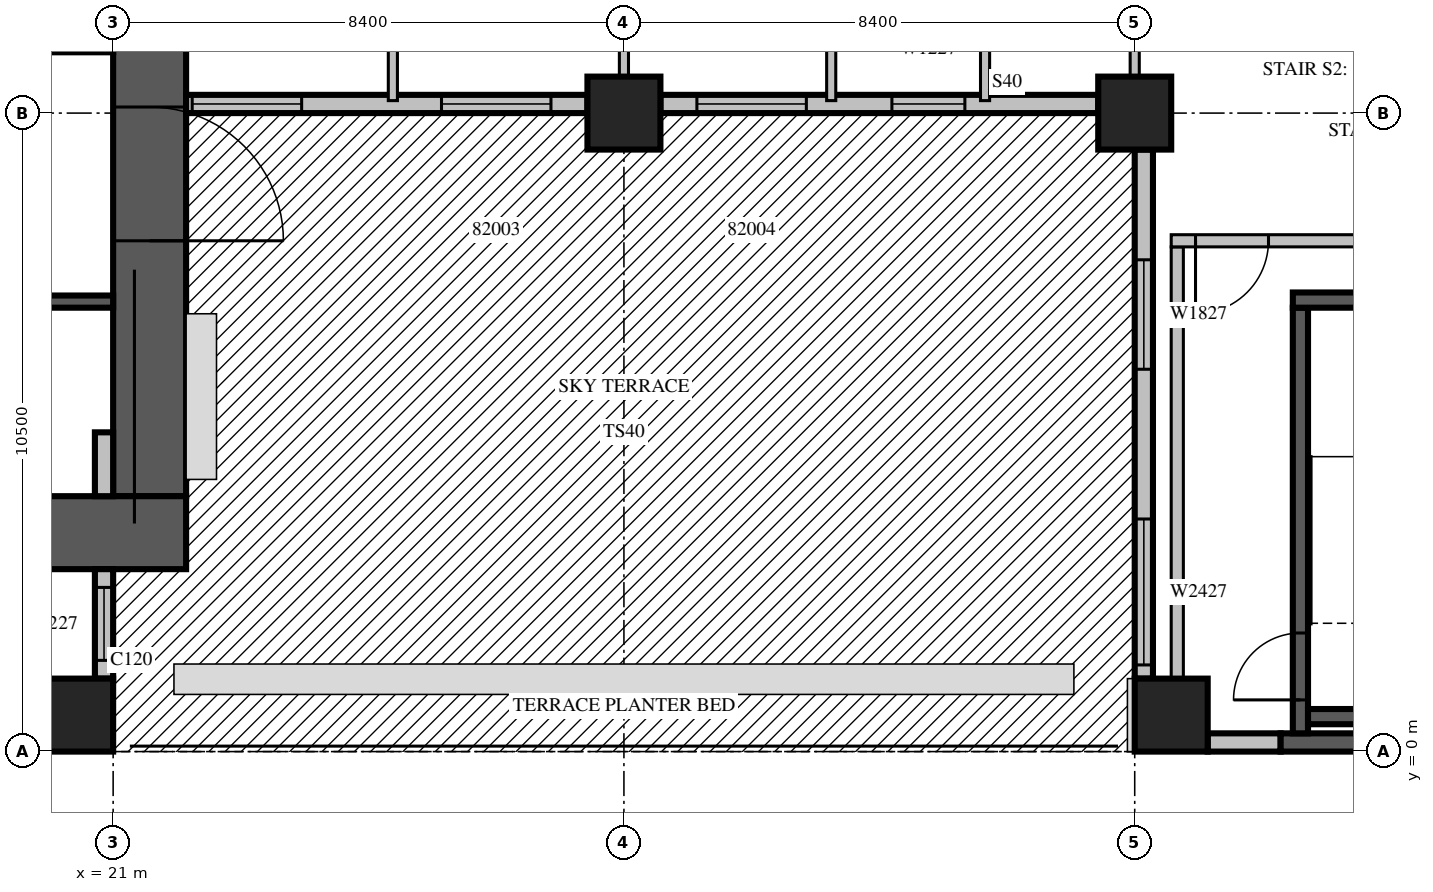
"""IFC4 building model, lengths in metres.
Left out: names, types, materials, properties, quantities, classifications, styles, units other than length and angle.
Written with IfcOpenShell. Run it as: python <this file> out.ifc"""

import sys

from ifc_helpers import new_model, si_unit, direction, frame, frame_2d, origin, origin_2d, place, context, subcontext, project, spatial, rectangle, extrude, source, transform, mapped, element, fill, save


model = new_model("IFC4")
c1 = context("Model", 3, precision=1e-05, world=origin(), true_north=direction((0.0, 1.0)))
c2 = subcontext(c1, "Body", "Model", "MODEL_VIEW")
j1 = project(units=[si_unit("LENGTHUNIT", "METRE"), si_unit("PLANEANGLEUNIT", "RADIAN")], contexts=[c1])
p1 = place(None, origin())
s1 = spatial("IfcSite", under=j1, at=p1, CompositionType="ELEMENT")
p2 = place(p1, origin())
s2 = spatial("IfcBuilding", under=s1, at=p2, CompositionType="ELEMENT")
p3 = place(p2, frame((0.0, 0.0, 95.1)))
s3 = spatial("IfcBuildingStorey", under=s2, at=p3, CompositionType="ELEMENT", Elevation=95.1)
m1 = source(origin(), c2, "Body", "SweptSolid", [
    extrude(rectangle(XDim=1.2, YDim=1.2, at=origin_2d()), origin(), (0.0, 0.0, 1.0), 4.2),
])
for number, where, z_axis, x_axis in (
    (1, (20.4, 0.6, 0.0), (0.0, 0.0, 1.0), (1.0, 0.0, 0.0)),
    (2, (38.4, 0.6, 0.0), (0.0, 0.0, 1.0), (1.0, 0.0, 0.0)),
    (3, (29.4, 10.5, 0.0), (0.0, 0.0, 1.0), (1.0, 0.0, 0.0)),
    (4, (37.8, 10.5, 0.0), (0.0, 0.0, 1.0), (1.0, 0.0, 0.0)),
):
    element("IfcColumn", number, at=place(p3, frame(where, z_axis=z_axis, x_axis=x_axis)), inside=s3, PredefinedType="COLUMN", context=c2, shape_type="MappedRepresentation", body=[
        mapped(m1, transform((0.0, 0.0, 0.0), scale=1.0)),
    ])
m2 = source(origin(), c2, "Body", "SweptSolid", [
    extrude(rectangle(XDim=16.8, YDim=1.2, at=frame_2d((8.4, 0.0))), origin(), (0.0, 0.0, 1.0), 4.2),
])
p4 = place(p3, frame((21.6, 4.2, 0.0), z_axis=(0.0, 0.0, 1.0), x_axis=(0.0, 1.0, 0.0)))
e5 = element("IfcWall", 5, at=p4, inside=s3, PredefinedType="SHEAR", context=c2, shape_type="MappedRepresentation", body=[
    mapped(m2, transform((0.0, 0.0, 0.0), scale=1.0)),
])
m3 = source(origin(), c2, "Body", "SweptSolid", [
    extrude(rectangle(XDim=2.2, YDim=2.1, at=frame_2d((1.1, 1.05))), frame((0.0, 0.61, 0.0), z_axis=(0.0, -1.0, 0.0), x_axis=(1.0, 0.0, 0.0)), (0.0, 0.0, 1.0), 1.22),
])
p5 = place(p4, frame((4.2, 0.0, 0.0)))
e6 = element("IfcOpeningElement", 6, at=p5, cuts=e5, PredefinedType="OPENING", context=c2, shape_type="MappedRepresentation", body=[
    mapped(m3, transform((0.0, 0.0, 0.0), scale=1.0)),
])
m4 = source(origin(), c2, "Body", "SweptSolid", [
    extrude(rectangle(XDim=1.2, YDim=2.1, at=frame_2d((0.6, 1.05))), frame((0.0, 0.61, 0.0), z_axis=(0.0, -1.0, 0.0), x_axis=(1.0, 0.0, 0.0)), (0.0, 0.0, 1.0), 1.22),
])
p6 = place(p4, frame((14.7, 0.0, 0.0)))
e7 = element("IfcOpeningElement", 7, at=p6, cuts=e5, PredefinedType="OPENING", context=c2, shape_type="MappedRepresentation", body=[
    mapped(m4, transform((0.0, 0.0, 0.0), scale=1.0)),
])
m5 = source(origin(), c2, "Body", "SweptSolid", [
    extrude(rectangle(XDim=18.0, YDim=1.2, at=frame_2d((9.0, 0.0))), origin(), (0.0, 0.0, 1.0), 4.2),
])
p7 = place(p3, frame((4.2, 3.6, 0.0), z_axis=(0.0, 0.0, 1.0), x_axis=(1.0, 0.0, 0.0)))
e8 = element("IfcWall", 8, at=p7, inside=s3, PredefinedType="SHEAR", context=c2, shape_type="MappedRepresentation", body=[
    mapped(m5, transform((0.0, 0.0, 0.0), scale=1.0)),
])
m6 = source(origin(), c2, "Body", "SweptSolid", [
    extrude(rectangle(XDim=1.8, YDim=0.3, at=frame_2d((0.9, 0.0))), origin(), (0.0, 0.0, 1.0), 3.8),
])
p8 = place(p3, frame((20.85, 1.2, 0.0), z_axis=(0.0, 0.0, 1.0), x_axis=(0.0, 1.0, 0.0)))
e9 = element("IfcWall", 9, at=p8, inside=s3, PredefinedType="STANDARD", context=c2, shape_type="MappedRepresentation", body=[
    mapped(m6, transform((0.0, 0.0, 0.0), scale=1.0)),
])
m7 = source(origin(), c2, "Body", "SweptSolid", [
    extrude(rectangle(XDim=1.2, YDim=2.7, at=frame_2d((0.6, 1.35))), frame((0.0, 0.16, 0.0), z_axis=(0.0, -1.0, 0.0), x_axis=(1.0, 0.0, 0.0)), (0.0, 0.0, 1.0), 0.32),
])
p9 = place(p8, frame((0.3, 0.0, 0.6)))
e10 = element("IfcOpeningElement", 10, at=p9, cuts=e9, PredefinedType="OPENING", context=c2, shape_type="MappedRepresentation", body=[
    mapped(m7, transform((0.0, 0.0, 0.0), scale=1.0)),
])
m8 = source(origin(), c2, "Body", "SweptSolid", [
    extrude(rectangle(XDim=1.05, YDim=0.3, at=frame_2d((0.525, 0.0))), origin(), (0.0, 0.0, 1.0), 3.8),
])
p10 = place(p3, frame((20.85, 4.2, 0.0), z_axis=(0.0, 0.0, 1.0), x_axis=(0.0, 1.0, 0.0)))
e11 = element("IfcWall", 11, at=p10, inside=s3, PredefinedType="STANDARD", context=c2, shape_type="MappedRepresentation", body=[
    mapped(m8, transform((0.0, 0.0, 0.0), scale=1.0)),
])
m9 = source(origin(), c2, "Body", "SweptSolid", [
    extrude(rectangle(XDim=6.6, YDim=0.3, at=frame_2d((3.3, 0.0))), origin(), (0.0, 0.0, 1.0), 3.8),
])
p11 = place(p3, frame((22.2, 10.65, 0.0), z_axis=(0.0, 0.0, 1.0), x_axis=(1.0, 0.0, 0.0)))
e12 = element("IfcWall", 12, at=p11, inside=s3, PredefinedType="STANDARD", context=c2, shape_type="MappedRepresentation", body=[
    mapped(m9, transform((0.0, 0.0, 0.0), scale=1.0)),
])
m10 = source(origin(), c2, "Body", "SweptSolid", [
    extrude(rectangle(XDim=1.8, YDim=2.4, at=frame_2d((0.9, 1.2))), frame((0.0, 0.16, 0.0), z_axis=(0.0, -1.0, 0.0), x_axis=(1.0, 0.0, 0.0)), (0.0, 0.0, 1.0), 0.32),
])
p12 = place(p11, frame((0.1, 0.0, 0.0)))
e13 = element("IfcOpeningElement", 13, at=p12, cuts=e12, PredefinedType="OPENING", context=c2, shape_type="MappedRepresentation", body=[
    mapped(m10, transform((0.0, 0.0, 0.0), scale=1.0)),
])
p13 = place(p11, frame((4.2, 0.0, 0.0)))
e14 = element("IfcOpeningElement", 14, at=p13, cuts=e12, PredefinedType="OPENING", context=c2, shape_type="MappedRepresentation", body=[
    mapped(m10, transform((0.0, 0.0, 0.0), scale=1.0)),
])
m11 = source(origin(), c2, "Body", "SweptSolid", [
    extrude(rectangle(XDim=7.2, YDim=0.3, at=frame_2d((3.6, 0.0))), origin(), (0.0, 0.0, 1.0), 3.8),
])
p14 = place(p3, frame((30.0, 10.65, 0.0), z_axis=(0.0, 0.0, 1.0), x_axis=(1.0, 0.0, 0.0)))
e15 = element("IfcWall", 15, at=p14, inside=s3, PredefinedType="STANDARD", context=c2, shape_type="MappedRepresentation", body=[
    mapped(m11, transform((0.0, 0.0, 0.0), scale=1.0)),
])
p15 = place(p14, frame((0.6, 0.0, 0.0)))
e16 = element("IfcOpeningElement", 16, at=p15, cuts=e15, PredefinedType="OPENING", context=c2, shape_type="MappedRepresentation", body=[
    mapped(m10, transform((0.0, 0.0, 0.0), scale=1.0)),
])
p16 = place(p14, frame((3.807, 0.0, 0.6)))
e17 = element("IfcOpeningElement", 17, at=p16, cuts=e15, PredefinedType="OPENING", context=c2, shape_type="MappedRepresentation", body=[
    mapped(m7, transform((0.0, 0.0, 0.0), scale=1.0)),
])
m12 = source(origin(), c2, "Body", "SweptSolid", [
    extrude(rectangle(XDim=8.7, YDim=0.3, at=frame_2d((4.35, 0.0))), origin(), (0.0, 0.0, 1.0), 3.8),
])
p17 = place(p3, frame((37.95, 9.9, 0.0), z_axis=(0.0, 0.0, 1.0), x_axis=(0.0, -1.0, 0.0)))
e18 = element("IfcWall", 18, at=p17, inside=s3, PredefinedType="STANDARD", context=c2, shape_type="MappedRepresentation", body=[
    mapped(m12, transform((0.0, 0.0, 0.0), scale=1.0)),
])
m13 = source(origin(), c2, "Body", "SweptSolid", [
    extrude(rectangle(XDim=1.8, YDim=2.7, at=frame_2d((0.9, 1.35))), frame((0.0, 0.16, 0.0), z_axis=(0.0, -1.0, 0.0), x_axis=(1.0, 0.0, 0.0)), (0.0, 0.0, 1.0), 0.32),
])
p18 = place(p17, frame((1.812, 0.0, 0.6)))
e19 = element("IfcOpeningElement", 19, at=p18, cuts=e18, PredefinedType="OPENING", context=c2, shape_type="MappedRepresentation", body=[
    mapped(m13, transform((0.0, 0.0, 0.0), scale=1.0)),
])
m14 = source(origin(), c2, "Body", "SweptSolid", [
    extrude(rectangle(XDim=2.4, YDim=2.7, at=frame_2d((1.2, 1.35))), frame((0.0, 0.16, 0.0), z_axis=(0.0, -1.0, 0.0), x_axis=(1.0, 0.0, 0.0)), (0.0, 0.0, 1.0), 0.32),
])
p19 = place(p17, frame((6.075, 0.0, 0.6)))
e20 = element("IfcOpeningElement", 20, at=p19, cuts=e18, PredefinedType="OPENING", context=c2, shape_type="MappedRepresentation", body=[
    mapped(m14, transform((0.0, 0.0, 0.0), scale=1.0)),
])
m15 = source(origin(), c2, "Body", "SweptSolid", [
    extrude(rectangle(XDim=1.2, YDim=0.3, at=frame_2d((0.6, 0.0))), origin(), (0.0, 0.0, 1.0), 3.8),
])
p20 = place(p3, frame((39.0, 0.15, 0.0), z_axis=(0.0, 0.0, 1.0), x_axis=(1.0, 0.0, 0.0)))
e21 = element("IfcWall", 21, at=p20, inside=s3, PredefinedType="STANDARD", context=c2, shape_type="MappedRepresentation", body=[
    mapped(m15, transform((0.0, 0.0, 0.0), scale=1.0)),
])
m16 = source(origin(), c2, "Body", "SweptSolid", [
    extrude(rectangle(XDim=3.8, YDim=0.3, at=frame_2d((1.9, 0.0))), origin(), (0.0, 0.0, 1.0), 3.8),
])
p21 = place(p3, frame((40.2, 0.15, 0.0), z_axis=(0.0, 0.0, 1.0), x_axis=(1.0, 0.0, 0.0)))
e22 = element("IfcWall", 22, at=p21, inside=s3, PredefinedType="SOLIDWALL", context=c2, shape_type="MappedRepresentation", body=[
    mapped(m16, transform((0.0, 0.0, 0.0), scale=1.0)),
])
m17 = source(origin(), c2, "Body", "SweptSolid", [
    extrude(rectangle(XDim=16.8, YDim=0.2, at=frame_2d((8.4, 0.0))), origin(), (0.0, 0.0, 1.0), 4.2),
])
p22 = place(p3, frame((4.2, 7.4, 0.0), z_axis=(0.0, 0.0, 1.0), x_axis=(1.0, 0.0, 0.0)))
e23 = element("IfcWall", 23, at=p22, inside=s3, PredefinedType="SOLIDWALL", context=c2, shape_type="MappedRepresentation", body=[
    mapped(m17, transform((0.0, 0.0, 0.0), scale=1.0)),
])
m18 = source(origin(), c2, "Body", "SweptSolid", [
    extrude(rectangle(XDim=1.1, YDim=2.1, at=frame_2d((0.55, 1.05))), frame((0.0, 0.11, 0.0), z_axis=(0.0, -1.0, 0.0), x_axis=(1.0, 0.0, 0.0)), (0.0, 0.0, 1.0), 0.22),
])
p23 = place(p22, frame((0.65, 0.0, 0.0)))
e24 = element("IfcOpeningElement", 24, at=p23, cuts=e23, PredefinedType="OPENING", context=c2, shape_type="MappedRepresentation", body=[
    mapped(m18, transform((0.0, 0.0, 0.0), scale=1.0)),
])
p24 = place(p22, frame((3.05, 0.0, 0.0)))
e25 = element("IfcOpeningElement", 25, at=p24, cuts=e23, PredefinedType="OPENING", context=c2, shape_type="MappedRepresentation", body=[
    mapped(m18, transform((0.0, 0.0, 0.0), scale=1.0)),
])
p25 = place(p22, frame((5.45, 0.0, 0.0)))
e26 = element("IfcOpeningElement", 26, at=p25, cuts=e23, PredefinedType="OPENING", context=c2, shape_type="MappedRepresentation", body=[
    mapped(m18, transform((0.0, 0.0, 0.0), scale=1.0)),
])
p26 = place(p22, frame((7.85, 0.0, 0.0)))
e27 = element("IfcOpeningElement", 27, at=p26, cuts=e23, PredefinedType="OPENING", context=c2, shape_type="MappedRepresentation", body=[
    mapped(m18, transform((0.0, 0.0, 0.0), scale=1.0)),
])
m19 = source(origin(), c2, "Body", "SweptSolid", [
    extrude(rectangle(XDim=7.0, YDim=0.25, at=frame_2d((3.5, 0.0))), origin(), (0.0, 0.0, 1.0), 3.8),
])
p27 = place(p3, frame((40.525, 0.3, 0.0), z_axis=(0.0, 0.0, 1.0), x_axis=(0.0, 1.0, 0.0)))
e28 = element("IfcWall", 28, at=p27, inside=s3, PredefinedType="SOLIDWALL", context=c2, shape_type="MappedRepresentation", body=[
    mapped(m19, transform((0.0, 0.0, 0.0), scale=1.0)),
])
m20 = source(origin(), c2, "Body", "SweptSolid", [
    extrude(rectangle(XDim=1.1, YDim=2.1, at=frame_2d((0.55, 1.05))), frame((0.0, 0.135, 0.0), z_axis=(0.0, -1.0, 0.0), x_axis=(1.0, 0.0, 0.0)), (0.0, 0.0, 1.0), 0.27),
])
p28 = place(p27, frame((0.55, 0.0, 0.0)))
e29 = element("IfcOpeningElement", 29, at=p28, cuts=e28, PredefinedType="OPENING", context=c2, shape_type="MappedRepresentation", body=[
    mapped(m20, transform((0.0, 0.0, 0.0), scale=1.0)),
])
m21 = source(origin(), c2, "Body", "SweptSolid", [
    extrude(rectangle(XDim=3.45, YDim=0.25, at=frame_2d((1.725, 0.0))), origin(), (0.0, 0.0, 1.0), 3.8),
])
p29 = place(p3, frame((40.4, 7.425, 0.0), z_axis=(0.0, 0.0, 1.0), x_axis=(1.0, 0.0, 0.0)))
e30 = element("IfcWall", 30, at=p29, inside=s3, PredefinedType="SOLIDWALL", context=c2, shape_type="MappedRepresentation", body=[
    mapped(m21, transform((0.0, 0.0, 0.0), scale=1.0)),
])
m22 = source(origin(), c2, "Body", "SweptSolid", [
    extrude(rectangle(XDim=2.95, YDim=0.25, at=frame_2d((1.475, 0.0))), origin(), (0.0, 0.0, 1.0), 3.8),
])
p30 = place(p3, frame((40.65, 0.575, 0.0), z_axis=(0.0, 0.0, 1.0), x_axis=(1.0, 0.0, 0.0)))
e31 = element("IfcWall", 31, at=p30, inside=s3, PredefinedType="SOLIDWALL", context=c2, shape_type="MappedRepresentation", body=[
    mapped(m22, transform((0.0, 0.0, 0.0), scale=1.0)),
])
m23 = source(origin(), c2, "Body", "SweptSolid", [
    extrude(rectangle(XDim=8.0, YDim=0.2, at=frame_2d((4.0, 0.0))), origin(), (0.0, 0.0, 1.0), 3.8),
])
p31 = place(p3, frame((38.5, 0.3, 0.0), z_axis=(0.0, 0.0, 1.0), x_axis=(0.0, 1.0, 0.0)))
e32 = element("IfcWall", 32, at=p31, inside=s3, PredefinedType="PARTITIONING", context=c2, shape_type="MappedRepresentation", body=[
    mapped(m23, transform((0.0, 0.0, 0.0), scale=1.0)),
])
m24 = source(origin(), c2, "Body", "SweptSolid", [
    extrude(rectangle(XDim=5.45, YDim=0.2, at=frame_2d((2.725, 0.0))), origin(), (0.0, 0.0, 1.0), 3.8),
])
p32 = place(p3, frame((38.4, 8.4, 0.0), z_axis=(0.0, 0.0, 1.0), x_axis=(1.0, 0.0, 0.0)))
e33 = element("IfcWall", 33, at=p32, inside=s3, PredefinedType="PARTITIONING", context=c2, shape_type="MappedRepresentation", body=[
    mapped(m24, transform((0.0, 0.0, 0.0), scale=1.0)),
])
m25 = source(origin(), c2, "Body", "SweptSolid", [
    extrude(rectangle(XDim=1.2, YDim=2.1, at=frame_2d((0.6, 1.05))), frame((0.0, 0.11, 0.0), z_axis=(0.0, -1.0, 0.0), x_axis=(1.0, 0.0, 0.0)), (0.0, 0.0, 1.0), 0.22),
])
p33 = place(p32, frame((0.4, 0.0, 0.0)))
e34 = element("IfcOpeningElement", 34, at=p33, cuts=e33, PredefinedType="OPENING", context=c2, shape_type="MappedRepresentation", body=[
    mapped(m25, transform((0.0, 0.0, 0.0), scale=1.0)),
])
m26 = source(origin(), c2, "Body", "SweptSolid", [
    extrude(rectangle(XDim=0.9, YDim=2.1, at=frame_2d((0.45, 1.05))), frame((0.0, 0.11, 0.0), z_axis=(0.0, -1.0, 0.0), x_axis=(1.0, 0.0, 0.0)), (0.0, 0.0, 1.0), 0.22),
])
p34 = place(p32, frame((3.25, 0.0, 0.0)))
e35 = element("IfcOpeningElement", 35, at=p34, cuts=e33, PredefinedType="OPENING", context=c2, shape_type="MappedRepresentation", body=[
    mapped(m26, transform((0.0, 0.0, 0.0), scale=1.0)),
])
m27 = source(origin(), c2, "Body", "SweptSolid", [
    extrude(rectangle(XDim=4.295, YDim=0.15, at=frame_2d((2.147, 0.0))), origin(), (0.0, 0.0, 1.0), 3.8),
])
p35 = place(p3, frame((25.6, 15.0, 0.0), z_axis=(0.0, 0.0, 1.0), x_axis=(0.0, -1.0, 0.0)))
e36 = element("IfcWall", 36, at=p35, inside=s3, PredefinedType="PARTITIONING", context=c2, shape_type="MappedRepresentation", body=[
    mapped(m27, transform((0.0, 0.0, 0.0), scale=1.0)),
])
m28 = source(origin(), c2, "Body", "SweptSolid", [
    extrude(rectangle(XDim=0.9, YDim=2.1, at=frame_2d((0.45, 1.05))), frame((0.0, 0.085, 0.0), z_axis=(0.0, -1.0, 0.0), x_axis=(1.0, 0.0, 0.0)), (0.0, 0.0, 1.0), 0.17),
])
p36 = place(p35, frame((1.113, 0.0, 0.0)))
e37 = element("IfcOpeningElement", 37, at=p36, cuts=e36, PredefinedType="OPENING", context=c2, shape_type="MappedRepresentation", body=[
    mapped(m28, transform((0.0, 0.0, 0.0), scale=1.0)),
])
m29 = source(origin(), c2, "Body", "SweptSolid", [
    extrude(rectangle(XDim=3.901, YDim=0.15, at=frame_2d((1.95, 0.0))), origin(), (0.0, 0.0, 1.0), 3.8),
])
p37 = place(p3, frame((29.4, 11.099, 0.0), z_axis=(0.0, 0.0, 1.0), x_axis=(0.0, 1.0, 0.0)))
e38 = element("IfcWall", 38, at=p37, inside=s3, PredefinedType="PARTITIONING", context=c2, shape_type="MappedRepresentation", body=[
    mapped(m29, transform((0.0, 0.0, 0.0), scale=1.0)),
])
for number, where, z_axis, x_axis in (
    (39, (32.809, 10.705, 0.0), (0.0, 0.0, 1.0), (0.0, 1.0, 0.0)),
    (40, (35.339, 10.705, 0.0), (0.0, 0.0, 1.0), (0.0, 1.0, 0.0)),
):
    element("IfcWall", number, at=place(p3, frame(where, z_axis=z_axis, x_axis=x_axis)), inside=s3, PredefinedType="PARTITIONING", context=c2, shape_type="MappedRepresentation", body=[
        mapped(m27, transform((0.0, 0.0, 0.0), scale=1.0)),
    ])
p38 = place(p3, frame((37.8, 11.099, 0.0), z_axis=(0.0, 0.0, 1.0), x_axis=(0.0, 1.0, 0.0)))
e41 = element("IfcWall", 41, at=p38, inside=s3, PredefinedType="PARTITIONING", context=c2, shape_type="MappedRepresentation", body=[
    mapped(m29, transform((0.0, 0.0, 0.0), scale=1.0)),
])
m30 = source(origin(), c2, "Body", "SweptSolid", [
    extrude(rectangle(XDim=1.2, YDim=2.7, at=frame_2d((0.6, 1.35))), frame((0.0, 0.03, 0.0), z_axis=(0.0, -1.0, 0.0), x_axis=(1.0, 0.0, 0.0)), (0.0, 0.0, 1.0), 0.06),
])
p39 = place(p9, origin())
e42 = element("IfcWindow", 42, at=p39, inside=s3, PartitioningType="SINGLE_PANEL", PredefinedType="WINDOW", context=c2, shape_type="MappedRepresentation", body=[
    mapped(m30, transform((0.0, 0.0, 0.0), scale=1.0)),
])
fill(e10, e42)
m31 = source(origin(), c2, "Body", "SweptSolid", [
    extrude(rectangle(XDim=1.8, YDim=2.4, at=frame_2d((0.9, 1.2))), frame((0.0, 0.025, 0.0), z_axis=(0.0, -1.0, 0.0), x_axis=(1.0, 0.0, 0.0)), (0.0, 0.0, 1.0), 0.05),
])
p40 = place(p12, origin())
e43 = element("IfcDoor", 43, at=p40, inside=s3, OperationType="SLIDING_TO_LEFT", PredefinedType="DOOR", context=c2, shape_type="MappedRepresentation", body=[
    mapped(m31, transform((0.0, 0.0, 0.0), scale=1.0)),
])
fill(e13, e43)
p41 = place(p13, origin())
e44 = element("IfcDoor", 44, at=p41, inside=s3, OperationType="SLIDING_TO_LEFT", PredefinedType="DOOR", context=c2, shape_type="MappedRepresentation", body=[
    mapped(m31, transform((0.0, 0.0, 0.0), scale=1.0)),
])
fill(e14, e44)
p42 = place(p15, origin())
e45 = element("IfcDoor", 45, at=p42, inside=s3, OperationType="SLIDING_TO_LEFT", PredefinedType="DOOR", context=c2, shape_type="MappedRepresentation", body=[
    mapped(m31, transform((0.0, 0.0, 0.0), scale=1.0)),
])
fill(e16, e45)
p43 = place(p16, origin())
e46 = element("IfcWindow", 46, at=p43, inside=s3, PartitioningType="SINGLE_PANEL", PredefinedType="WINDOW", context=c2, shape_type="MappedRepresentation", body=[
    mapped(m30, transform((0.0, 0.0, 0.0), scale=1.0)),
])
fill(e17, e46)
m32 = source(origin(), c2, "Body", "SweptSolid", [
    extrude(rectangle(XDim=1.8, YDim=2.7, at=frame_2d((0.9, 1.35))), frame((0.0, 0.03, 0.0), z_axis=(0.0, -1.0, 0.0), x_axis=(1.0, 0.0, 0.0)), (0.0, 0.0, 1.0), 0.06),
])
p44 = place(p18, origin())
e47 = element("IfcWindow", 47, at=p44, inside=s3, PartitioningType="SINGLE_PANEL", PredefinedType="WINDOW", context=c2, shape_type="MappedRepresentation", body=[
    mapped(m32, transform((0.0, 0.0, 0.0), scale=1.0)),
])
fill(e19, e47)
m33 = source(origin(), c2, "Body", "SweptSolid", [
    extrude(rectangle(XDim=2.4, YDim=2.7, at=frame_2d((1.2, 1.35))), frame((0.0, 0.03, 0.0), z_axis=(0.0, -1.0, 0.0), x_axis=(1.0, 0.0, 0.0)), (0.0, 0.0, 1.0), 0.06),
])
p45 = place(p19, origin())
e48 = element("IfcWindow", 48, at=p45, inside=s3, PartitioningType="SINGLE_PANEL", PredefinedType="WINDOW", context=c2, shape_type="MappedRepresentation", body=[
    mapped(m33, transform((0.0, 0.0, 0.0), scale=1.0)),
])
fill(e20, e48)
m34 = source(origin(), c2, "Body", "SweptSolid", [
    extrude(rectangle(XDim=1.1, YDim=2.1, at=frame_2d((0.55, 1.05))), frame((0.0, 0.025, 0.0), z_axis=(0.0, -1.0, 0.0), x_axis=(1.0, 0.0, 0.0)), (0.0, 0.0, 1.0), 0.05),
])
p46 = place(p28, origin())
e49 = element("IfcDoor", 49, at=p46, inside=s3, OperationType="SINGLE_SWING_LEFT", PredefinedType="DOOR", context=c2, shape_type="MappedRepresentation", body=[
    mapped(m34, transform((0.0, 0.0, 0.0), scale=1.0)),
])
fill(e29, e49)
m35 = source(origin(), c2, "Body", "SweptSolid", [
    extrude(rectangle(XDim=1.2, YDim=2.1, at=frame_2d((0.6, 1.05))), frame((0.0, 0.025, 0.0), z_axis=(0.0, -1.0, 0.0), x_axis=(1.0, 0.0, 0.0)), (0.0, 0.0, 1.0), 0.05),
])
p47 = place(p33, origin())
e50 = element("IfcDoor", 50, at=p47, inside=s3, OperationType="SINGLE_SWING_RIGHT", PredefinedType="DOOR", context=c2, shape_type="MappedRepresentation", body=[
    mapped(m35, transform((0.0, 0.0, 0.0), scale=1.0)),
])
fill(e34, e50)
m36 = source(origin(), c2, "Body", "SweptSolid", [
    extrude(rectangle(XDim=2.2, YDim=2.1, at=frame_2d((1.1, 1.05))), frame((0.0, 0.025, 0.0), z_axis=(0.0, -1.0, 0.0), x_axis=(1.0, 0.0, 0.0)), (0.0, 0.0, 1.0), 0.05),
])
p48 = place(p5, origin())
e51 = element("IfcDoor", 51, at=p48, inside=s3, OperationType="DOUBLE_DOOR_SINGLE_SWING", PredefinedType="DOOR", context=c2, shape_type="MappedRepresentation", body=[
    mapped(m36, transform((0.0, 0.0, 0.0), scale=1.0)),
])
fill(e6, e51)
save(model, sys.argv[1])
